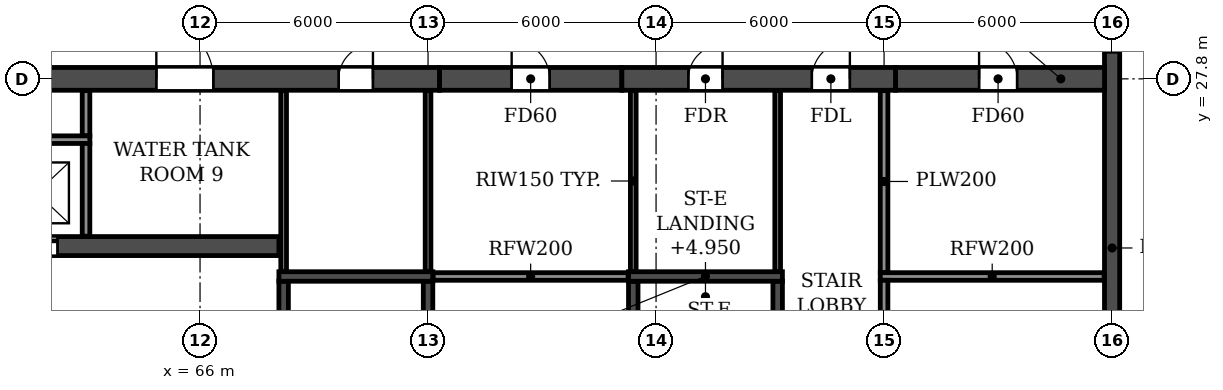
"""IFC4 building model, lengths in metres.
Left out: names, types, materials, properties, quantities, classifications, styles, units other than length and angle.
Written with IfcOpenShell. Run it as: python <this file> out.ifc"""

import sys

from ifc_helpers import new_model, si_unit, direction, frame, frame_2d, origin, place, context, subcontext, project, spatial, rectangle, extrude, element, fill, save


model = new_model("IFC4")
c1 = context("Model", 3, precision=1e-05, world=origin(), true_north=direction((0.0, 1.0)))
c2 = subcontext(c1, "Body", "Model", "MODEL_VIEW")
j1 = project(units=[si_unit("LENGTHUNIT", "METRE"), si_unit("PLANEANGLEUNIT", "RADIAN")], contexts=[c1])
p1 = place(None, origin())
s1 = spatial("IfcSite", under=j1, at=p1, CompositionType="ELEMENT")
p2 = place(p1, origin())
s2 = spatial("IfcBuilding", under=s1, at=p2, CompositionType="ELEMENT")
p3 = place(p2, frame((0.0, 0.0, 115.8)))
s3 = spatial("IfcBuildingStorey", under=s2, at=p3, CompositionType="ELEMENT", Elevation=115.8)
p4 = place(p3, frame((90.0, 4.683, 0.0), z_axis=(0.0, 0.0, 1.0), x_axis=(0.0, 1.0, 0.0)))
e1 = element("IfcWall", 1, at=p4, inside=s3, PredefinedType="SHEAR", context=c2, shape_type="SweptSolid", body=[
    extrude(rectangle(XDim=34.234, YDim=0.4, at=frame_2d((17.117, 0.0))), origin(), (0.0, 0.0, 1.0), 6.37),
])
p5 = place(p4, frame((23.817, 0.0, 0.9)))
e2 = element("IfcOpeningElement", 2, at=p5, cuts=e1, PredefinedType="OPENING", context=c2, shape_type="SweptSolid", body=[
    extrude(rectangle(XDim=1.2, YDim=1.5, at=frame_2d((0.6, 0.75))), frame((0.0, 0.21, 0.0), z_axis=(0.0, -1.0, 0.0), x_axis=(1.0, 0.0, 0.0)), (0.0, 0.0, 1.0), 0.42),
])
p6 = place(p4, frame((8.017, 0.0, 0.9)))
e3 = element("IfcOpeningElement", 3, at=p6, cuts=e1, PredefinedType="OPENING", context=c2, shape_type="SweptSolid", body=[
    extrude(rectangle(XDim=1.2, YDim=1.5, at=frame_2d((0.6, 0.75))), frame((0.0, 0.21, 0.0), z_axis=(0.0, -1.0, 0.0), x_axis=(1.0, 0.0, 0.0)), (0.0, 0.0, 1.0), 0.42),
])
p7 = place(p4, frame((13.317, 0.0, 0.9)))
e4 = element("IfcOpeningElement", 4, at=p7, cuts=e1, PredefinedType="OPENING", context=c2, shape_type="SweptSolid", body=[
    extrude(rectangle(XDim=1.2, YDim=1.5, at=frame_2d((0.6, 0.75))), frame((0.0, 0.21, 0.0), z_axis=(0.0, -1.0, 0.0), x_axis=(1.0, 0.0, 0.0)), (0.0, 0.0, 1.0), 0.42),
])
p8 = place(p3, frame((72.3, 27.8, 0.0), z_axis=(0.0, 0.0, 1.0), x_axis=(1.0, 0.0, 0.0)))
e5 = element("IfcWall", 5, at=p8, inside=s3, PredefinedType="SHEAR", context=c2, shape_type="SweptSolid", body=[
    extrude(rectangle(XDim=4.8, YDim=0.6, at=frame_2d((2.4, 0.0))), origin(), (0.0, 0.0, 1.0), 6.37),
])
p9 = place(p8, frame((1.9, 0.0, 0.0)))
e6 = element("IfcOpeningElement", 6, at=p9, cuts=e5, PredefinedType="OPENING", context=c2, shape_type="SweptSolid", body=[
    extrude(rectangle(XDim=1.0, YDim=2.1, at=frame_2d((0.5, 1.05))), frame((0.0, 0.31, 0.0), z_axis=(0.0, -1.0, 0.0), x_axis=(1.0, 0.0, 0.0)), (0.0, 0.0, 1.0), 0.62),
])
p10 = place(p3, frame((84.3, 27.8, 0.0), z_axis=(0.0, 0.0, 1.0), x_axis=(1.0, 0.0, 0.0)))
e7 = element("IfcWall", 7, at=p10, inside=s3, PredefinedType="SHEAR", context=c2, shape_type="SweptSolid", body=[
    extrude(rectangle(XDim=5.5, YDim=0.6, at=frame_2d((2.75, 0.0))), origin(), (0.0, 0.0, 1.0), 6.37),
])
p11 = place(p10, frame((2.2, 0.0, 0.0)))
e8 = element("IfcOpeningElement", 8, at=p11, cuts=e7, PredefinedType="OPENING", context=c2, shape_type="SweptSolid", body=[
    extrude(rectangle(XDim=1.0, YDim=2.1, at=frame_2d((0.5, 1.05))), frame((0.0, 0.31, 0.0), z_axis=(0.0, -1.0, 0.0), x_axis=(1.0, 0.0, 0.0)), (0.0, 0.0, 1.0), 0.62),
])
p12 = place(p3, frame((29.7, 27.8, 0.0), z_axis=(0.0, 0.0, 1.0), x_axis=(1.0, 0.0, 0.0)))
e9 = element("IfcWall", 9, at=p12, inside=s3, PredefinedType="SOLIDWALL", context=c2, shape_type="SweptSolid", body=[
    extrude(rectangle(XDim=42.6, YDim=0.6, at=frame_2d((21.3, 0.0))), origin(), (0.0, 0.0, 1.0), 6.37),
])
p13 = place(p12, frame((1.75, 0.0, 0.0)))
e10 = element("IfcOpeningElement", 10, at=p13, cuts=e9, PredefinedType="OPENING", context=c2, shape_type="SweptSolid", body=[
    extrude(rectangle(XDim=0.9, YDim=2.1, at=frame_2d((0.45, 1.05))), frame((0.0, 0.31, 0.0), z_axis=(0.0, -1.0, 0.0), x_axis=(1.0, 0.0, 0.0)), (0.0, 0.0, 1.0), 0.62),
])
p14 = place(p12, frame((6.2, 0.0, 0.0)))
e11 = element("IfcOpeningElement", 11, at=p14, cuts=e9, PredefinedType="OPENING", context=c2, shape_type="SweptSolid", body=[
    extrude(rectangle(XDim=1.0, YDim=2.1, at=frame_2d((0.5, 1.05))), frame((0.0, 0.31, 0.0), z_axis=(0.0, -1.0, 0.0), x_axis=(1.0, 0.0, 0.0)), (0.0, 0.0, 1.0), 0.62),
])
p15 = place(p12, frame((11.4, 0.0, 0.0)))
e12 = element("IfcOpeningElement", 12, at=p15, cuts=e9, PredefinedType="OPENING", context=c2, shape_type="SweptSolid", body=[
    extrude(rectangle(XDim=1.0, YDim=2.1, at=frame_2d((0.5, 1.05))), frame((0.0, 0.31, 0.0), z_axis=(0.0, -1.0, 0.0), x_axis=(1.0, 0.0, 0.0)), (0.0, 0.0, 1.0), 0.62),
])
p16 = place(p12, frame((17.9, 0.0, 0.0)))
e13 = element("IfcOpeningElement", 13, at=p16, cuts=e9, PredefinedType="OPENING", context=c2, shape_type="SweptSolid", body=[
    extrude(rectangle(XDim=1.0, YDim=2.1, at=frame_2d((0.5, 1.05))), frame((0.0, 0.31, 0.0), z_axis=(0.0, -1.0, 0.0), x_axis=(1.0, 0.0, 0.0)), (0.0, 0.0, 1.0), 0.62),
])
p17 = place(p12, frame((20.8, 0.0, 0.0)))
e14 = element("IfcOpeningElement", 14, at=p17, cuts=e9, PredefinedType="OPENING", context=c2, shape_type="SweptSolid", body=[
    extrude(rectangle(XDim=1.0, YDim=2.1, at=frame_2d((0.5, 1.05))), frame((0.0, 0.31, 0.0), z_axis=(0.0, -1.0, 0.0), x_axis=(1.0, 0.0, 0.0)), (0.0, 0.0, 1.0), 0.62),
])
p18 = place(p12, frame((25.0, 0.0, 0.0)))
e15 = element("IfcOpeningElement", 15, at=p18, cuts=e9, PredefinedType="OPENING", context=c2, shape_type="SweptSolid", body=[
    extrude(rectangle(XDim=1.0, YDim=2.1, at=frame_2d((0.5, 1.05))), frame((0.0, 0.31, 0.0), z_axis=(0.0, -1.0, 0.0), x_axis=(1.0, 0.0, 0.0)), (0.0, 0.0, 1.0), 0.62),
])
p19 = place(p12, frame((30.2, 0.0, 0.0)))
e16 = element("IfcOpeningElement", 16, at=p19, cuts=e9, PredefinedType="OPENING", context=c2, shape_type="SweptSolid", body=[
    extrude(rectangle(XDim=1.0, YDim=2.1, at=frame_2d((0.5, 1.05))), frame((0.0, 0.31, 0.0), z_axis=(0.0, -1.0, 0.0), x_axis=(1.0, 0.0, 0.0)), (0.0, 0.0, 1.0), 0.62),
])
p20 = place(p12, frame((35.15, 0.0, 0.0)))
e17 = element("IfcOpeningElement", 17, at=p20, cuts=e9, PredefinedType="OPENING", context=c2, shape_type="SweptSolid", body=[
    extrude(rectangle(XDim=1.5, YDim=2.1, at=frame_2d((0.75, 1.05))), frame((0.0, 0.31, 0.0), z_axis=(0.0, -1.0, 0.0), x_axis=(1.0, 0.0, 0.0)), (0.0, 0.0, 1.0), 0.62),
])
p21 = place(p12, frame((39.95, 0.0, 0.0)))
e18 = element("IfcOpeningElement", 18, at=p21, cuts=e9, PredefinedType="OPENING", context=c2, shape_type="SweptSolid", body=[
    extrude(rectangle(XDim=0.9, YDim=2.1, at=frame_2d((0.45, 1.05))), frame((0.0, 0.31, 0.0), z_axis=(0.0, -1.0, 0.0), x_axis=(1.0, 0.0, 0.0)), (0.0, 0.0, 1.0), 0.62),
])
p22 = place(p3, frame((77.1, 27.8, 0.0), z_axis=(0.0, 0.0, 1.0), x_axis=(1.0, 0.0, 0.0)))
e19 = element("IfcWall", 19, at=p22, inside=s3, PredefinedType="SOLIDWALL", context=c2, shape_type="SweptSolid", body=[
    extrude(rectangle(XDim=7.2, YDim=0.6, at=frame_2d((3.6, 0.0))), origin(), (0.0, 0.0, 1.0), 6.37),
])
p23 = place(p22, frame((1.75, 0.0, 0.0)))
e20 = element("IfcOpeningElement", 20, at=p23, cuts=e19, PredefinedType="OPENING", context=c2, shape_type="SweptSolid", body=[
    extrude(rectangle(XDim=0.9, YDim=2.1, at=frame_2d((0.45, 1.05))), frame((0.0, 0.31, 0.0), z_axis=(0.0, -1.0, 0.0), x_axis=(1.0, 0.0, 0.0)), (0.0, 0.0, 1.0), 0.62),
])
p24 = place(p22, frame((5.0, 0.0, 0.0)))
e21 = element("IfcOpeningElement", 21, at=p24, cuts=e19, PredefinedType="OPENING", context=c2, shape_type="SweptSolid", body=[
    extrude(rectangle(XDim=1.0, YDim=2.1, at=frame_2d((0.5, 1.05))), frame((0.0, 0.31, 0.0), z_axis=(0.0, -1.0, 0.0), x_axis=(1.0, 0.0, 0.0)), (0.0, 0.0, 1.0), 0.62),
])
p25 = place(p3, frame((33.925, 23.4, 0.0), z_axis=(0.0, 0.0, 1.0), x_axis=(1.0, 0.0, 0.0)))
e22 = element("IfcWall", 22, at=p25, inside=s3, PredefinedType="SOLIDWALL", context=c2, shape_type="SweptSolid", body=[
    extrude(rectangle(XDim=34.15, YDim=0.5, at=frame_2d((17.075, 0.0))), origin(), (0.0, 0.0, 1.0), 6.37),
])
p26 = place(p25, frame((16.175, 0.0, 0.0)))
e23 = element("IfcOpeningElement", 23, at=p26, cuts=e22, PredefinedType="OPENING", context=c2, shape_type="SweptSolid", body=[
    extrude(rectangle(XDim=1.8, YDim=2.1, at=frame_2d((0.9, 1.05))), frame((0.0, 0.26, 0.0), z_axis=(0.0, -1.0, 0.0), x_axis=(1.0, 0.0, 0.0)), (0.0, 0.0, 1.0), 0.52),
])
p27 = place(p25, frame((0.625, 0.0, 0.0)))
e24 = element("IfcOpeningElement", 24, at=p27, cuts=e22, PredefinedType="OPENING", context=c2, shape_type="SweptSolid", body=[
    extrude(rectangle(XDim=1.1, YDim=2.1, at=frame_2d((0.55, 1.05))), frame((0.0, 0.26, 0.0), z_axis=(0.0, -1.0, 0.0), x_axis=(1.0, 0.0, 0.0)), (0.0, 0.0, 1.0), 0.52),
])
p28 = place(p25, frame((3.225, 0.0, 0.0)))
e25 = element("IfcOpeningElement", 25, at=p28, cuts=e22, PredefinedType="OPENING", context=c2, shape_type="SweptSolid", body=[
    extrude(rectangle(XDim=1.1, YDim=2.1, at=frame_2d((0.55, 1.05))), frame((0.0, 0.26, 0.0), z_axis=(0.0, -1.0, 0.0), x_axis=(1.0, 0.0, 0.0)), (0.0, 0.0, 1.0), 0.52),
])
p29 = place(p25, frame((5.825, 0.0, 0.0)))
e26 = element("IfcOpeningElement", 26, at=p29, cuts=e22, PredefinedType="OPENING", context=c2, shape_type="SweptSolid", body=[
    extrude(rectangle(XDim=1.1, YDim=2.1, at=frame_2d((0.55, 1.05))), frame((0.0, 0.26, 0.0), z_axis=(0.0, -1.0, 0.0), x_axis=(1.0, 0.0, 0.0)), (0.0, 0.0, 1.0), 0.52),
])
p30 = place(p25, frame((8.425, 0.0, 0.0)))
e27 = element("IfcOpeningElement", 27, at=p30, cuts=e22, PredefinedType="OPENING", context=c2, shape_type="SweptSolid", body=[
    extrude(rectangle(XDim=1.1, YDim=2.1, at=frame_2d((0.55, 1.05))), frame((0.0, 0.26, 0.0), z_axis=(0.0, -1.0, 0.0), x_axis=(1.0, 0.0, 0.0)), (0.0, 0.0, 1.0), 0.52),
])
p31 = place(p25, frame((11.025, 0.0, 0.0)))
e28 = element("IfcOpeningElement", 28, at=p31, cuts=e22, PredefinedType="OPENING", context=c2, shape_type="SweptSolid", body=[
    extrude(rectangle(XDim=1.1, YDim=2.1, at=frame_2d((0.55, 1.05))), frame((0.0, 0.26, 0.0), z_axis=(0.0, -1.0, 0.0), x_axis=(1.0, 0.0, 0.0)), (0.0, 0.0, 1.0), 0.52),
])
p32 = place(p25, frame((13.625, 0.0, 0.0)))
e29 = element("IfcOpeningElement", 29, at=p32, cuts=e22, PredefinedType="OPENING", context=c2, shape_type="SweptSolid", body=[
    extrude(rectangle(XDim=1.1, YDim=2.1, at=frame_2d((0.55, 1.05))), frame((0.0, 0.26, 0.0), z_axis=(0.0, -1.0, 0.0), x_axis=(1.0, 0.0, 0.0)), (0.0, 0.0, 1.0), 0.52),
])
p33 = place(p25, frame((19.425, 0.0, 0.0)))
e30 = element("IfcOpeningElement", 30, at=p33, cuts=e22, PredefinedType="OPENING", context=c2, shape_type="SweptSolid", body=[
    extrude(rectangle(XDim=1.1, YDim=2.1, at=frame_2d((0.55, 1.05))), frame((0.0, 0.26, 0.0), z_axis=(0.0, -1.0, 0.0), x_axis=(1.0, 0.0, 0.0)), (0.0, 0.0, 1.0), 0.52),
])
p34 = place(p25, frame((22.025, 0.0, 0.0)))
e31 = element("IfcOpeningElement", 31, at=p34, cuts=e22, PredefinedType="OPENING", context=c2, shape_type="SweptSolid", body=[
    extrude(rectangle(XDim=1.1, YDim=2.1, at=frame_2d((0.55, 1.05))), frame((0.0, 0.26, 0.0), z_axis=(0.0, -1.0, 0.0), x_axis=(1.0, 0.0, 0.0)), (0.0, 0.0, 1.0), 0.52),
])
p35 = place(p25, frame((27.225, 0.0, 0.0)))
e32 = element("IfcOpeningElement", 32, at=p35, cuts=e22, PredefinedType="OPENING", context=c2, shape_type="SweptSolid", body=[
    extrude(rectangle(XDim=1.1, YDim=2.1, at=frame_2d((0.55, 1.05))), frame((0.0, 0.26, 0.0), z_axis=(0.0, -1.0, 0.0), x_axis=(1.0, 0.0, 0.0)), (0.0, 0.0, 1.0), 0.52),
])
p36 = place(p3, frame((68.2, 14.85, 0.0), z_axis=(0.0, 0.0, 1.0), x_axis=(0.0, 1.0, 0.0)))
e33 = element("IfcWall", 33, at=p36, inside=s3, PredefinedType="SOLIDWALL", context=c2, shape_type="SweptSolid", body=[
    extrude(rectangle(XDim=7.625, YDim=0.25, at=frame_2d((3.812, 0.0))), origin(), (0.0, 0.0, 1.0), 6.37),
])
p37 = place(p36, frame((0.45, 0.0, 0.0)))
e34 = element("IfcOpeningElement", 34, at=p37, cuts=e33, PredefinedType="OPENING", context=c2, shape_type="SweptSolid", body=[
    extrude(rectangle(XDim=1.0, YDim=2.1, at=frame_2d((0.5, 1.05))), frame((0.0, 0.135, 0.0), z_axis=(0.0, -1.0, 0.0), x_axis=(1.0, 0.0, 0.0)), (0.0, 0.0, 1.0), 0.27),
])
p38 = place(p3, frame((72.0, 14.85, 0.0), z_axis=(0.0, 0.0, 1.0), x_axis=(0.0, 1.0, 0.0)))
e35 = element("IfcWall", 35, at=p38, inside=s3, PredefinedType="SOLIDWALL", context=c2, shape_type="SweptSolid", body=[
    extrude(rectangle(XDim=7.625, YDim=0.25, at=frame_2d((3.812, 0.0))), origin(), (0.0, 0.0, 1.0), 6.37),
])
p39 = place(p3, frame((68.075, 22.6, 0.0), z_axis=(0.0, 0.0, 1.0), x_axis=(1.0, 0.0, 0.0)))
e36 = element("IfcWall", 36, at=p39, inside=s3, PredefinedType="SOLIDWALL", context=c2, shape_type="SweptSolid", body=[
    extrude(rectangle(XDim=4.05, YDim=0.25, at=frame_2d((2.025, 0.0))), origin(), (0.0, 0.0, 1.0), 6.37),
])
p40 = place(p3, frame((77.4, 14.85, 0.0), z_axis=(0.0, 0.0, 1.0), x_axis=(0.0, 1.0, 0.0)))
e37 = element("IfcWall", 37, at=p40, inside=s3, PredefinedType="SOLIDWALL", context=c2, shape_type="SweptSolid", body=[
    extrude(rectangle(XDim=7.625, YDim=0.25, at=frame_2d((3.812, 0.0))), origin(), (0.0, 0.0, 1.0), 6.37),
])
p41 = place(p40, frame((0.45, 0.0, 0.0)))
e38 = element("IfcOpeningElement", 38, at=p41, cuts=e37, PredefinedType="OPENING", context=c2, shape_type="SweptSolid", body=[
    extrude(rectangle(XDim=1.0, YDim=2.1, at=frame_2d((0.5, 1.05))), frame((0.0, 0.135, 0.0), z_axis=(0.0, -1.0, 0.0), x_axis=(1.0, 0.0, 0.0)), (0.0, 0.0, 1.0), 0.27),
])
p42 = place(p3, frame((81.2, 14.85, 0.0), z_axis=(0.0, 0.0, 1.0), x_axis=(0.0, 1.0, 0.0)))
e39 = element("IfcWall", 39, at=p42, inside=s3, PredefinedType="SOLIDWALL", context=c2, shape_type="SweptSolid", body=[
    extrude(rectangle(XDim=7.625, YDim=0.25, at=frame_2d((3.812, 0.0))), origin(), (0.0, 0.0, 1.0), 6.37),
])
p43 = place(p42, frame((0.45, 0.0, 0.0)))
e40 = element("IfcOpeningElement", 40, at=p43, cuts=e39, PredefinedType="OPENING", context=c2, shape_type="SweptSolid", body=[
    extrude(rectangle(XDim=1.0, YDim=2.1, at=frame_2d((0.5, 1.05))), frame((0.0, 0.135, 0.0), z_axis=(0.0, -1.0, 0.0), x_axis=(1.0, 0.0, 0.0)), (0.0, 0.0, 1.0), 0.27),
])
p44 = place(p3, frame((77.275, 22.6, 0.0), z_axis=(0.0, 0.0, 1.0), x_axis=(1.0, 0.0, 0.0)))
e41 = element("IfcWall", 41, at=p44, inside=s3, PredefinedType="SOLIDWALL", context=c2, shape_type="SweptSolid", body=[
    extrude(rectangle(XDim=4.05, YDim=0.25, at=frame_2d((2.025, 0.0))), origin(), (0.0, 0.0, 1.0), 6.37),
])
p45 = place(p3, frame((63.0, 26.3, 0.0), z_axis=(0.0, 0.0, 1.0), x_axis=(0.0, 1.0, 0.0)))
e42 = element("IfcWall", 42, at=p45, inside=s3, PredefinedType="PARTITIONING", context=c2, shape_type="SweptSolid", body=[
    extrude(rectangle(XDim=1.19, YDim=0.2, at=frame_2d((0.595, 0.0))), origin(), (0.0, 0.0, 1.0), 6.37),
])
p46 = place(p3, frame((84.0, 22.7, 0.0), z_axis=(0.0, 0.0, 1.0), x_axis=(0.0, 1.0, 0.0)))
e43 = element("IfcWall", 43, at=p46, inside=s3, PredefinedType="PARTITIONING", context=c2, shape_type="SweptSolid", body=[
    extrude(rectangle(XDim=4.79, YDim=0.2, at=frame_2d((2.395, 0.0))), origin(), (0.0, 0.0, 1.0), 6.37),
])
p47 = place(p3, frame((72.135, 22.6, 0.0), z_axis=(0.0, 0.0, 1.0), x_axis=(1.0, 0.0, 0.0)))
e44 = element("IfcWall", 44, at=p47, inside=s3, PredefinedType="PARTITIONING", context=c2, shape_type="SweptSolid", body=[
    extrude(rectangle(XDim=5.13, YDim=0.2, at=frame_2d((2.565, 0.0))), origin(), (0.0, 0.0, 1.0), 6.37),
])
p48 = place(p3, frame((83.9, 22.6, 0.0), z_axis=(0.0, 0.0, 1.0), x_axis=(1.0, 0.0, 0.0)))
e45 = element("IfcWall", 45, at=p48, inside=s3, PredefinedType="PARTITIONING", context=c2, shape_type="SweptSolid", body=[
    extrude(rectangle(XDim=5.89, YDim=0.2, at=frame_2d((2.945, 0.0))), origin(), (0.0, 0.0, 1.0), 6.37),
])
p49 = place(p3, frame((84.0, 14.91, 0.0), z_axis=(0.0, 0.0, 1.0), x_axis=(0.0, 1.0, 0.0)))
e46 = element("IfcWall", 46, at=p49, inside=s3, PredefinedType="PARTITIONING", context=c2, shape_type="SweptSolid", body=[
    extrude(rectangle(XDim=7.59, YDim=0.2, at=frame_2d((3.795, 0.0))), origin(), (0.0, 0.0, 1.0), 6.37),
])
p50 = place(p49, frame((3.19, 0.0, 0.0)))
e47 = element("IfcOpeningElement", 47, at=p50, cuts=e46, PredefinedType="OPENING", context=c2, shape_type="SweptSolid", body=[
    extrude(rectangle(XDim=1.0, YDim=2.1, at=frame_2d((0.5, 1.05))), frame((0.0, 0.11, 0.0), z_axis=(0.0, -1.0, 0.0), x_axis=(1.0, 0.0, 0.0)), (0.0, 0.0, 1.0), 0.22),
])
for number, where, z_axis, x_axis in (
    (48, (68.2, 22.735, 0.0), (0.0, 0.0, 1.0), (0.0, 1.0, 0.0)),
    (49, (72.0, 22.735, 0.0), (0.0, 0.0, 1.0), (0.0, 1.0, 0.0)),
    (50, (77.4, 22.735, 0.0), (0.0, 0.0, 1.0), (0.0, 1.0, 0.0)),
    (51, (81.2, 22.735, 0.0), (0.0, 0.0, 1.0), (0.0, 1.0, 0.0)),
):
    element("IfcWall", number, at=place(p3, frame(where, z_axis=z_axis, x_axis=x_axis)), inside=s3, PredefinedType="PARTITIONING", context=c2, shape_type="SweptSolid", body=[
        extrude(rectangle(XDim=4.755, YDim=0.15, at=frame_2d((2.377, 0.0))), origin(), (0.0, 0.0, 1.0), 6.37),
    ])
p51 = place(p3, frame((52.5, 26.2, 0.0), z_axis=(0.0, 0.0, 1.0), x_axis=(1.0, 0.0, 0.0)))
e52 = element("IfcWall", 52, at=p51, inside=s3, PredefinedType="PARTITIONING", context=c2, shape_type="SweptSolid", body=[
    extrude(rectangle(XDim=10.6, YDim=0.2, at=frame_2d((5.3, 0.0))), origin(), (0.0, 0.0, 1.0), 6.37),
])
p52 = place(p3, frame((63.0, 23.66, 0.0), z_axis=(0.0, 0.0, 1.0), x_axis=(0.0, 1.0, 0.0)))
e53 = element("IfcWall", 53, at=p52, inside=s3, PredefinedType="PARTITIONING", context=c2, shape_type="SweptSolid", body=[
    extrude(rectangle(XDim=2.44, YDim=0.2, at=frame_2d((1.22, 0.0))), origin(), (0.0, 0.0, 1.0), 6.37),
])
p53 = place(p20, origin())
e54 = element("IfcDoor", 54, at=p53, inside=s3, OperationType="DOUBLE_DOOR_SINGLE_SWING", PredefinedType="DOOR", context=c2, shape_type="SweptSolid", body=[
    extrude(rectangle(XDim=1.5, YDim=2.1, at=frame_2d((0.75, 1.05))), frame((0.0, 0.025, 0.0), z_axis=(0.0, -1.0, 0.0), x_axis=(1.0, 0.0, 0.0)), (0.0, 0.0, 1.0), 0.05),
])
fill(e17, e54)
p54 = place(p21, origin())
e55 = element("IfcDoor", 55, at=p54, inside=s3, OperationType="SINGLE_SWING_RIGHT", PredefinedType="DOOR", context=c2, shape_type="SweptSolid", body=[
    extrude(rectangle(XDim=0.9, YDim=2.1, at=frame_2d((0.45, 1.05))), frame((0.0, 0.025, 0.0), z_axis=(0.0, -1.0, 0.0), x_axis=(1.0, 0.0, 0.0)), (0.0, 0.0, 1.0), 0.05),
])
fill(e18, e55)
p55 = place(p9, origin())
e56 = element("IfcDoor", 56, at=p55, inside=s3, OperationType="SINGLE_SWING_LEFT", PredefinedType="DOOR", context=c2, shape_type="SweptSolid", body=[
    extrude(rectangle(XDim=1.0, YDim=2.1, at=frame_2d((0.5, 1.05))), frame((0.0, 0.025, 0.0), z_axis=(0.0, -1.0, 0.0), x_axis=(1.0, 0.0, 0.0)), (0.0, 0.0, 1.0), 0.05),
])
fill(e6, e56)
p56 = place(p23, origin())
e57 = element("IfcDoor", 57, at=p56, inside=s3, OperationType="SINGLE_SWING_RIGHT", PredefinedType="DOOR", context=c2, shape_type="SweptSolid", body=[
    extrude(rectangle(XDim=0.9, YDim=2.1, at=frame_2d((0.45, 1.05))), frame((0.0, 0.025, 0.0), z_axis=(0.0, -1.0, 0.0), x_axis=(1.0, 0.0, 0.0)), (0.0, 0.0, 1.0), 0.05),
])
fill(e20, e57)
p57 = place(p24, origin())
e58 = element("IfcDoor", 58, at=p57, inside=s3, OperationType="SINGLE_SWING_RIGHT", PredefinedType="DOOR", context=c2, shape_type="SweptSolid", body=[
    extrude(rectangle(XDim=1.0, YDim=2.1, at=frame_2d((0.5, 1.05))), frame((0.0, 0.025, 0.0), z_axis=(0.0, -1.0, 0.0), x_axis=(1.0, 0.0, 0.0)), (0.0, 0.0, 1.0), 0.05),
])
fill(e21, e58)
p58 = place(p11, origin())
e59 = element("IfcDoor", 59, at=p58, inside=s3, OperationType="SINGLE_SWING_LEFT", PredefinedType="DOOR", context=c2, shape_type="SweptSolid", body=[
    extrude(rectangle(XDim=1.0, YDim=2.1, at=frame_2d((0.5, 1.05))), frame((0.0, 0.025, 0.0), z_axis=(0.0, -1.0, 0.0), x_axis=(1.0, 0.0, 0.0)), (0.0, 0.0, 1.0), 0.05),
])
fill(e8, e59)
p59 = place(p35, origin())
e60 = element("IfcDoor", 60, at=p59, inside=s3, OperationType="DOUBLE_DOOR_SLIDING", PredefinedType="DOOR", context=c2, shape_type="SweptSolid", body=[
    extrude(rectangle(XDim=1.1, YDim=2.1, at=frame_2d((0.55, 1.05))), frame((0.0, 0.025, 0.0), z_axis=(0.0, -1.0, 0.0), x_axis=(1.0, 0.0, 0.0)), (0.0, 0.0, 1.0), 0.05),
])
fill(e32, e60)
save(model, sys.argv[1])
